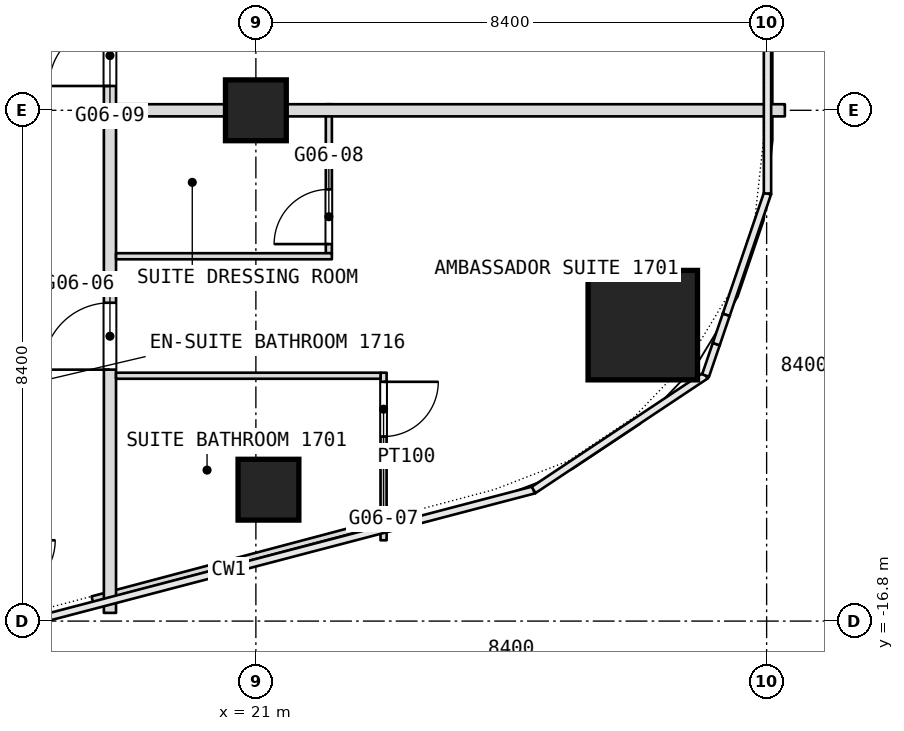
"""IFC4 building model, lengths in metres.
Left out: names, types, materials, properties, quantities, classifications, styles, units other than length and angle.
Written with IfcOpenShell. Run it as: python <this file> out.ifc"""

import sys

from ifc_helpers import new_model, si_unit, direction, frame, frame_2d, origin, origin_2d, place, context, subcontext, project, spatial, rectangle, extrude, element, fill, save


model = new_model("IFC4")
c1 = context("Model", 3, precision=1e-05, world=origin(), true_north=direction((0.0, 1.0)))
c2 = subcontext(c1, "Body", "Model", "MODEL_VIEW")
j1 = project(units=[si_unit("LENGTHUNIT", "METRE"), si_unit("PLANEANGLEUNIT", "RADIAN")], contexts=[c1])
p1 = place(None, origin())
s1 = spatial("IfcSite", under=j1, at=p1, CompositionType="ELEMENT")
p2 = place(p1, origin())
s2 = spatial("IfcBuilding", under=s1, at=p2, CompositionType="ELEMENT")
p3 = place(p2, frame((0.0, 0.0, 76.1)))
s3 = spatial("IfcBuildingStorey", under=s2, at=p3, CompositionType="ELEMENT", Elevation=76.1)
p4 = place(p3, frame((27.363, -11.933, 0.0), z_axis=(0.0, 0.0, 1.0), x_axis=(1.0, 0.0, 0.0)))
e1 = element("IfcColumn", 1, at=p4, inside=s3, PredefinedType="COLUMN", context=c2, shape_type="SweptSolid", body=[
    extrude(rectangle(XDim=1.8, YDim=1.8, at=origin_2d()), origin(), (0.0, 0.0, 1.0), 3.6),
])
for number, where, z_axis, x_axis in (
    (2, (21.0, -8.4, 0.0), (0.0, 0.0, 1.0), (1.0, 0.0, 0.0)),
    (3, (21.207, -14.639, 0.0), (0.0, 0.0, 1.0), (1.0, 0.0, 0.0)),
):
    element("IfcColumn", number, at=place(p3, frame(where, z_axis=z_axis, x_axis=x_axis)), inside=s3, PredefinedType="COLUMN", context=c2, shape_type="SweptSolid", body=[
        extrude(rectangle(XDim=1.0, YDim=1.0, at=origin_2d()), origin(), (0.0, 0.0, 1.0), 3.6),
    ])
p5 = place(p3, frame((23.1, -15.471, 0.0), z_axis=(0.0, 0.0, 1.0), x_axis=(0.0, 1.0, 0.0)))
e4 = element("IfcWall", 4, at=p5, inside=s3, PredefinedType="PARTITIONING", context=c2, shape_type="SweptSolid", body=[
    extrude(rectangle(XDim=2.756, YDim=0.1, at=frame_2d((1.378, 0.0))), origin(), (0.0, 0.0, 1.0), 3.34),
])
p6 = place(p5, frame((1.706, 0.0, 0.0)))
e5 = element("IfcOpeningElement", 5, at=p6, cuts=e4, PredefinedType="OPENING", context=c2, shape_type="SweptSolid", body=[
    extrude(rectangle(XDim=0.9, YDim=2.1, at=frame_2d((0.45, 1.05))), frame((0.0, 0.05, 0.0), z_axis=(0.0, -1.0, 0.0), x_axis=(1.0, 0.0, 0.0)), (0.0, 0.0, 1.0), 0.1),
])
p7 = place(p3, frame((22.2, -10.75, 0.0), z_axis=(0.0, 0.0, 1.0), x_axis=(0.0, 1.0, 0.0)))
e6 = element("IfcWall", 6, at=p7, inside=s3, PredefinedType="PARTITIONING", context=c2, shape_type="SweptSolid", body=[
    extrude(rectangle(XDim=2.45, YDim=0.1, at=frame_2d((1.225, 0.0))), origin(), (0.0, 0.0, 1.0), 3.34),
])
p8 = place(p7, frame((0.15, 0.0, 0.0)))
e7 = element("IfcOpeningElement", 7, at=p8, cuts=e6, PredefinedType="OPENING", context=c2, shape_type="SweptSolid", body=[
    extrude(rectangle(XDim=0.9, YDim=2.1, at=frame_2d((0.45, 1.05))), frame((0.0, 0.05, 0.0), z_axis=(0.0, -1.0, 0.0), x_axis=(1.0, 0.0, 0.0)), (0.0, 0.0, 1.0), 0.1),
])
p9 = place(p3, frame((18.31, -16.442, 0.0), z_axis=(0.0, 0.0, 1.0), x_axis=(0.966552628131, 0.256468354876, 0.0)))
e8 = element("IfcWall", 8, at=p9, inside=s3, PredefinedType="PARTITIONING", context=c2, shape_type="SweptSolid", body=[
    extrude(rectangle(XDim=5.256, YDim=0.1, at=frame_2d((2.628, 0.0))), origin(), (0.0, 0.0, 1.0), 3.34),
])
p10 = place(p3, frame((18.6, -16.665, 0.0), z_axis=(0.0, 0.0, 1.0), x_axis=(0.0, 1.0, 0.0)))
e9 = element("IfcWall", 9, at=p10, inside=s3, PredefinedType="PARTITIONING", context=c2, shape_type="SweptSolid", body=[
    extrude(rectangle(XDim=50.205, YDim=0.2, at=frame_2d((25.103, 0.0))), origin(), (0.0, 0.0, 1.0), 3.34),
])
p11 = place(p10, frame((4.0, 0.0, 0.0)))
e10 = element("IfcOpeningElement", 10, at=p11, cuts=e9, PredefinedType="OPENING", context=c2, shape_type="SweptSolid", body=[
    extrude(rectangle(XDim=1.1, YDim=2.1, at=frame_2d((0.55, 1.05))), frame((0.0, 0.1, 0.0), z_axis=(0.0, -1.0, 0.0), x_axis=(1.0, 0.0, 0.0)), (0.0, 0.0, 1.0), 0.2),
])
p12 = place(p10, frame((8.665, 0.0, 0.0)))
e11 = element("IfcOpeningElement", 11, at=p12, cuts=e9, PredefinedType="OPENING", context=c2, shape_type="SweptSolid", body=[
    extrude(rectangle(XDim=1.0, YDim=2.1, at=frame_2d((0.5, 1.05))), frame((0.0, 0.1, 0.0), z_axis=(0.0, -1.0, 0.0), x_axis=(1.0, 0.0, 0.0)), (0.0, 0.0, 1.0), 0.2),
])
p13 = place(p10, frame((15.265, 0.0, 0.0)))
e12 = element("IfcOpeningElement", 12, at=p13, cuts=e9, PredefinedType="OPENING", context=c2, shape_type="SweptSolid", body=[
    extrude(rectangle(XDim=1.0, YDim=2.1, at=frame_2d((0.5, 1.05))), frame((0.0, 0.1, 0.0), z_axis=(0.0, -1.0, 0.0), x_axis=(1.0, 0.0, 0.0)), (0.0, 0.0, 1.0), 0.2),
])
p14 = place(p10, frame((19.965, 0.0, 0.0)))
e13 = element("IfcOpeningElement", 13, at=p14, cuts=e9, PredefinedType="OPENING", context=c2, shape_type="SweptSolid", body=[
    extrude(rectangle(XDim=1.8, YDim=2.1, at=frame_2d((0.9, 1.05))), frame((0.0, 0.1, 0.0), z_axis=(0.0, -1.0, 0.0), x_axis=(1.0, 0.0, 0.0)), (0.0, 0.0, 1.0), 0.2),
])
p15 = place(p10, frame((28.665, 0.0, 0.0)))
e14 = element("IfcOpeningElement", 14, at=p15, cuts=e9, PredefinedType="OPENING", context=c2, shape_type="SweptSolid", body=[
    extrude(rectangle(XDim=1.1, YDim=2.1, at=frame_2d((0.55, 1.05))), frame((0.0, 0.1, 0.0), z_axis=(0.0, -1.0, 0.0), x_axis=(1.0, 0.0, 0.0)), (0.0, 0.0, 1.0), 0.2),
])
p16 = place(p10, frame((39.215, 0.0, 0.0)))
e15 = element("IfcOpeningElement", 15, at=p16, cuts=e9, PredefinedType="OPENING", context=c2, shape_type="SweptSolid", body=[
    extrude(rectangle(XDim=1.1, YDim=2.1, at=frame_2d((0.55, 1.05))), frame((0.0, 0.1, 0.0), z_axis=(0.0, -1.0, 0.0), x_axis=(1.0, 0.0, 0.0)), (0.0, 0.0, 1.0), 0.2),
])
p17 = place(p10, frame((45.165, 0.0, 0.0)))
e16 = element("IfcOpeningElement", 16, at=p17, cuts=e9, PredefinedType="OPENING", context=c2, shape_type="SweptSolid", body=[
    extrude(rectangle(XDim=1.8, YDim=2.1, at=frame_2d((0.9, 1.05))), frame((0.0, 0.1, 0.0), z_axis=(0.0, -1.0, 0.0), x_axis=(1.0, 0.0, 0.0)), (0.0, 0.0, 1.0), 0.2),
])
p18 = place(p3, frame((18.7, -12.765, 0.0), z_axis=(0.0, 0.0, 1.0), x_axis=(1.0, 0.0, 0.0)))
e17 = element("IfcWall", 17, at=p18, inside=s3, PredefinedType="PARTITIONING", context=c2, shape_type="SweptSolid", body=[
    extrude(rectangle(XDim=4.35, YDim=0.1, at=frame_2d((2.175, 0.0))), origin(), (0.0, 0.0, 1.0), 3.34),
])
p19 = place(p3, frame((18.7, -10.8, 0.0), z_axis=(0.0, 0.0, 1.0), x_axis=(1.0, 0.0, 0.0)))
e18 = element("IfcWall", 18, at=p19, inside=s3, PredefinedType="PARTITIONING", context=c2, shape_type="SweptSolid", body=[
    extrude(rectangle(XDim=3.55, YDim=0.1, at=frame_2d((1.775, 0.0))), origin(), (0.0, 0.0, 1.0), 3.34),
])
p20 = place(p3, frame((18.7, -8.4, 0.0), z_axis=(0.0, 0.0, 1.0), x_axis=(1.0, 0.0, 0.0)))
e19 = element("IfcWall", 19, at=p20, inside=s3, PredefinedType="PARTITIONING", context=c2, shape_type="SweptSolid", body=[
    extrude(rectangle(XDim=11.0, YDim=0.2, at=frame_2d((5.5, 0.0))), origin(), (0.0, 0.0, 1.0), 2.84),
])
p21 = place(p6, origin())
e20 = element("IfcDoor", 20, at=p21, inside=s3, OperationType="SINGLE_SWING_RIGHT", PredefinedType="DOOR", context=c2, shape_type="SweptSolid", body=[
    extrude(rectangle(XDim=0.9, YDim=2.1, at=frame_2d((0.45, 1.05))), frame((0.0, 0.025, 0.0), z_axis=(0.0, -1.0, 0.0), x_axis=(1.0, 0.0, 0.0)), (0.0, 0.0, 1.0), 0.05),
])
fill(e5, e20)
p22 = place(p8, origin())
e21 = element("IfcDoor", 21, at=p22, inside=s3, OperationType="SINGLE_SWING_LEFT", PredefinedType="DOOR", context=c2, shape_type="SweptSolid", body=[
    extrude(rectangle(XDim=0.9, YDim=2.1, at=frame_2d((0.45, 1.05))), frame((0.0, 0.025, 0.0), z_axis=(0.0, -1.0, 0.0), x_axis=(1.0, 0.0, 0.0)), (0.0, 0.0, 1.0), 0.05),
])
fill(e7, e21)
p23 = place(p11, origin())
e22 = element("IfcDoor", 22, at=p23, inside=s3, OperationType="SINGLE_SWING_RIGHT", PredefinedType="DOOR", context=c2, shape_type="SweptSolid", body=[
    extrude(rectangle(XDim=1.1, YDim=2.1, at=frame_2d((0.55, 1.05))), frame((0.0, 0.025, 0.0), z_axis=(0.0, -1.0, 0.0), x_axis=(1.0, 0.0, 0.0)), (0.0, 0.0, 1.0), 0.05),
])
fill(e10, e22)
p24 = place(p12, origin())
e23 = element("IfcDoor", 23, at=p24, inside=s3, OperationType="SINGLE_SWING_LEFT", PredefinedType="DOOR", context=c2, shape_type="SweptSolid", body=[
    extrude(rectangle(XDim=1.0, YDim=2.1, at=frame_2d((0.5, 1.05))), frame((0.0, 0.025, 0.0), z_axis=(0.0, -1.0, 0.0), x_axis=(1.0, 0.0, 0.0)), (0.0, 0.0, 1.0), 0.05),
])
fill(e11, e23)
save(model, sys.argv[1])
